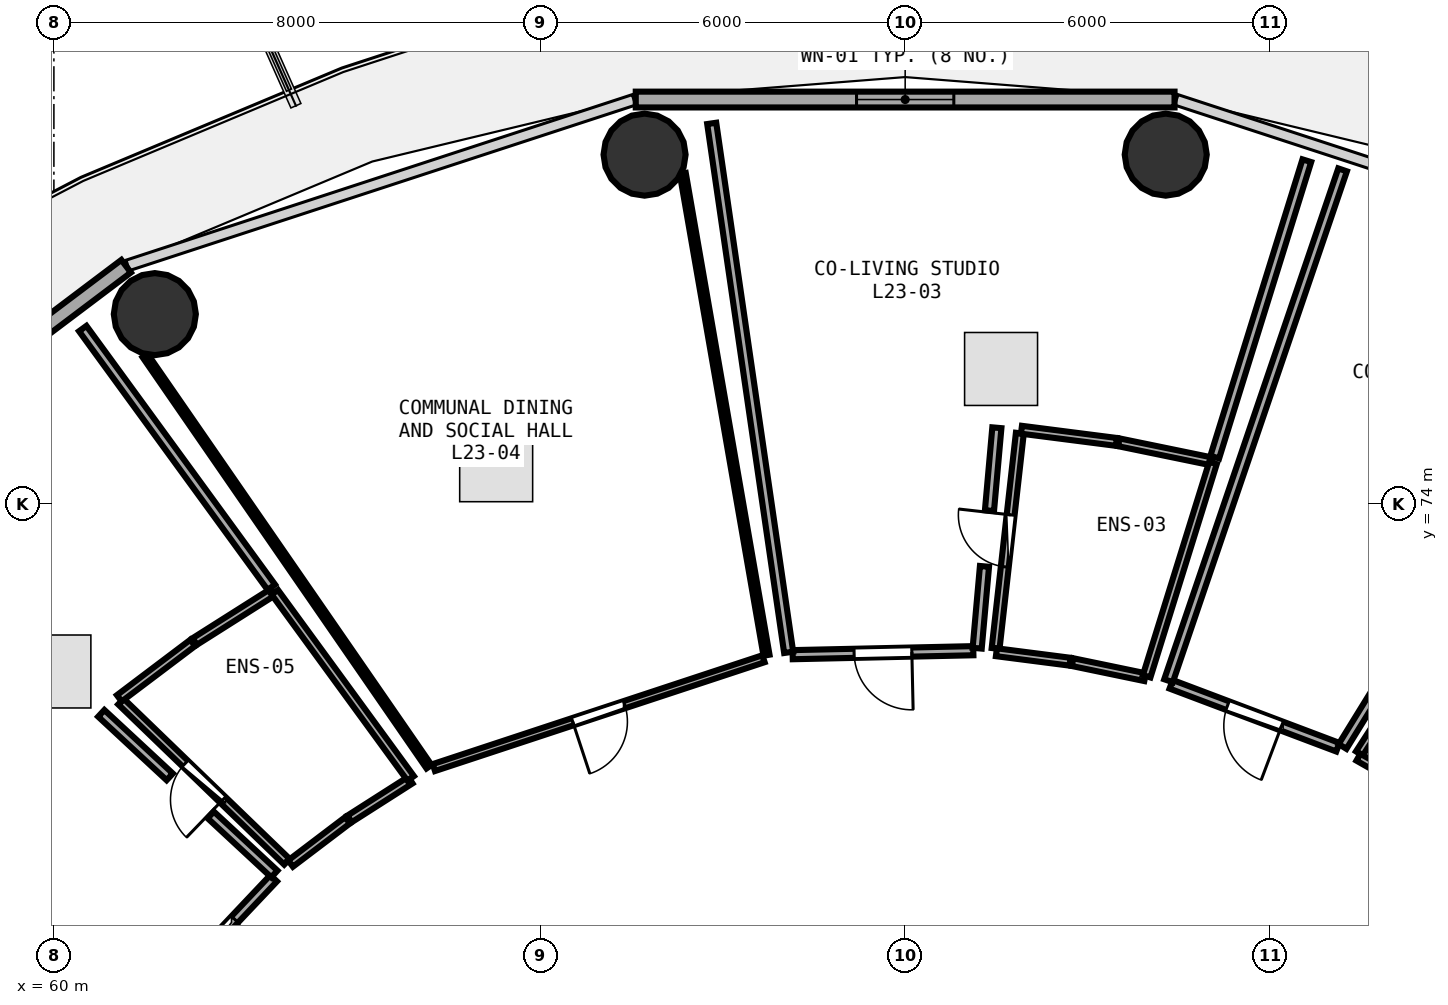
"""IFC4 building model, lengths in metres.
Left out: names, types, materials, properties, quantities, classifications, styles, units other than length and angle.
Written with IfcOpenShell. Run it as: python <this file> out.ifc"""

import sys

from ifc_helpers import new_model, si_unit, direction, frame, frame_2d, origin, origin_2d, place, context, subcontext, project, spatial, rectangle, circle, extrude, element, fill, save


model = new_model("IFC4")
c1 = context("Model", 3, precision=1e-05, world=origin(), true_north=direction((0.0, 1.0)))
c2 = subcontext(c1, "Body", "Model", "MODEL_VIEW")
j1 = project(units=[si_unit("LENGTHUNIT", "METRE"), si_unit("PLANEANGLEUNIT", "RADIAN")], contexts=[c1])
p1 = place(None, origin())
s1 = spatial("IfcSite", under=j1, at=p1, CompositionType="ELEMENT")
p2 = place(p1, origin())
s2 = spatial("IfcBuilding", under=s1, at=p2, CompositionType="ELEMENT")
p3 = place(p2, frame((0.0, 0.0, 91.35)))
s3 = spatial("IfcBuildingStorey", under=s2, at=p3, CompositionType="ELEMENT", Elevation=91.35)
for number, where, z_axis, x_axis in (
    (1, (78.286, 79.745, 0.0), (0.0, 0.0, 1.0), (1.0, 0.0, 0.0)),
    (2, (69.714, 79.745, 0.0), (0.0, 0.0, 1.0), (1.0, 0.0, 0.0)),
    (3, (61.66, 77.122, 0.0), (0.0, 0.0, 1.0), (1.0, 0.0, 0.0)),
):
    element("IfcColumn", number, at=place(p3, frame(where, z_axis=z_axis, x_axis=x_axis)), inside=s3, PredefinedType="COLUMN", context=c2, shape_type="SweptSolid", body=[
        extrude(circle(Radius=0.675, at=origin_2d()), origin(), (0.0, 0.0, 1.0), 3.75),
    ])
p4 = place(p3, frame((78.43, 80.651, 0.0), z_axis=(0.0, 0.0, 1.0), x_axis=(-1.0, 0.0, 0.0)))
e4 = element("IfcWall", 4, at=p4, inside=s3, PredefinedType="SOLIDWALL", context=c2, shape_type="SweptSolid", body=[
    extrude(rectangle(XDim=8.861, YDim=0.26, at=frame_2d((4.43, 0.0))), origin(), (0.0, 0.0, 1.0), 3.475),
])
p5 = place(p4, frame((3.63, 0.0, 0.85)))
e5 = element("IfcOpeningElement", 5, at=p5, cuts=e4, PredefinedType="OPENING", context=c2, shape_type="SweptSolid", body=[
    extrude(rectangle(XDim=1.6, YDim=1.45, at=frame_2d((0.8, 0.725))), frame((0.0, 0.14, 0.0), z_axis=(0.0, -1.0, 0.0), x_axis=(1.0, 0.0, 0.0)), (0.0, 0.0, 1.0), 0.28),
])
p6 = place(p3, frame((61.188, 77.91, 0.0), z_axis=(0.0, 0.0, 1.0), x_axis=(-0.798501507879, -0.601992808857, 0.0)))
e6 = element("IfcWall", 6, at=p6, inside=s3, PredefinedType="SOLIDWALL", context=c2, shape_type="SweptSolid", body=[
    extrude(rectangle(XDim=8.499, YDim=0.26, at=frame_2d((4.25, 0.0))), origin(), (0.0, 0.0, 1.0), 3.475),
])
p7 = place(p6, frame((3.45, 0.0, 0.85)))
e7 = element("IfcOpeningElement", 7, at=p7, cuts=e6, PredefinedType="OPENING", context=c2, shape_type="SweptSolid", body=[
    extrude(rectangle(XDim=1.6, YDim=1.45, at=frame_2d((0.8, 0.725))), frame((0.0, 0.14, 0.0), z_axis=(0.0, -1.0, 0.0), x_axis=(1.0, 0.0, 0.0)), (0.0, 0.0, 1.0), 0.28),
])
p8 = place(p3, frame((81.469, 69.896, 0.0), z_axis=(0.0, 0.0, 1.0), x_axis=(0.543429789712, 0.839454622748, 0.0)))
e8 = element("IfcWall", 8, at=p8, inside=s3, PredefinedType="PLUMBINGWALL", context=c2, shape_type="SweptSolid", body=[
    extrude(rectangle(XDim=3.686, YDim=0.13, at=frame_2d((1.843, 0.0))), origin(), (0.0, 0.0, 1.0), 3.175),
])
p9 = place(p8, frame((1.413, 0.0, 0.0)))
e9 = element("IfcOpeningElement", 9, at=p9, cuts=e8, PredefinedType="OPENING", context=c2, shape_type="SweptSolid", body=[
    extrude(rectangle(XDim=0.86, YDim=2.05, at=frame_2d((0.43, 1.025))), frame((0.0, 0.075, 0.0), z_axis=(0.0, -1.0, 0.0), x_axis=(1.0, 0.0, 0.0)), (0.0, 0.0, 1.0), 0.15),
])
p10 = place(p3, frame((81.117, 69.999, 0.0), z_axis=(0.0, 0.0, 1.0), x_axis=(-0.935632349103, 0.352976071868, 0.0)))
e10 = element("IfcWall", 10, at=p10, inside=s3, PredefinedType="PARTITIONING", context=c2, shape_type="SweptSolid", body=[
    extrude(rectangle(XDim=2.931, YDim=0.15, at=frame_2d((1.465, 0.0))), origin(), (0.0, 0.0, 1.0), 2.925),
])
p11 = place(p10, frame((0.99, 0.0, 0.0)))
e11 = element("IfcOpeningElement", 11, at=p11, cuts=e10, PredefinedType="OPENING", context=c2, shape_type="SweptSolid", body=[
    extrude(rectangle(XDim=0.95, YDim=2.08, at=frame_2d((0.475, 1.04))), frame((0.0, 0.085, 0.0), z_axis=(0.0, -1.0, 0.0), x_axis=(1.0, 0.0, 0.0)), (0.0, 0.0, 1.0), 0.17),
])
p12 = place(p3, frame((75.488, 71.624, 0.0), z_axis=(0.0, 0.0, 1.0), x_axis=(0.111853147635, 0.993724747284, 0.0)))
e12 = element("IfcWall", 12, at=p12, inside=s3, PredefinedType="PLUMBINGWALL", context=c2, shape_type="SweptSolid", body=[
    extrude(rectangle(XDim=3.562, YDim=0.13, at=frame_2d((1.781, 0.0))), origin(), (0.0, 0.0, 1.0), 3.175),
])
p13 = place(p12, frame((1.351, 0.0, 0.0)))
e13 = element("IfcOpeningElement", 13, at=p13, cuts=e12, PredefinedType="OPENING", context=c2, shape_type="SweptSolid", body=[
    extrude(rectangle(XDim=0.86, YDim=2.05, at=frame_2d((0.43, 1.025))), frame((0.0, 0.075, 0.0), z_axis=(0.0, -1.0, 0.0), x_axis=(1.0, 0.0, 0.0)), (0.0, 0.0, 1.0), 0.15),
])
p14 = place(p3, frame((75.121, 71.587, 0.0), z_axis=(0.0, 0.0, 1.0), x_axis=(-0.999757617916, -0.022016026426, 0.0)))
e14 = element("IfcWall", 14, at=p14, inside=s3, PredefinedType="PARTITIONING", context=c2, shape_type="SweptSolid", body=[
    extrude(rectangle(XDim=2.972, YDim=0.15, at=frame_2d((1.486, 0.0))), origin(), (0.0, 0.0, 1.0), 3.48),
])
p15 = place(p14, frame((1.011, 0.0, 0.0)))
e15 = element("IfcOpeningElement", 15, at=p15, cuts=e14, PredefinedType="OPENING", context=c2, shape_type="SweptSolid", body=[
    extrude(rectangle(XDim=0.95, YDim=2.08, at=frame_2d((0.475, 1.04))), frame((0.0, 0.085, 0.0), z_axis=(0.0, -1.0, 0.0), x_axis=(1.0, 0.0, 0.0)), (0.0, 0.0, 1.0), 0.17),
])
p16 = place(p3, frame((71.67, 71.454, 0.0), z_axis=(0.0, 0.0, 1.0), x_axis=(-0.949607265123, -0.313442246716, 0.0)))
e16 = element("IfcWall", 16, at=p16, inside=s3, PredefinedType="PARTITIONING", context=c2, shape_type="SweptSolid", body=[
    extrude(rectangle(XDim=5.708, YDim=0.12, at=frame_2d((2.854, 0.0))), origin(), (0.0, 0.0, 1.0), 2.925),
])
p17 = place(p16, frame((2.404, 0.0, 0.0)))
e17 = element("IfcOpeningElement", 17, at=p17, cuts=e16, PredefinedType="OPENING", context=c2, shape_type="SweptSolid", body=[
    extrude(rectangle(XDim=0.9, YDim=2.08, at=frame_2d((0.45, 1.04))), frame((0.0, 0.07, 0.0), z_axis=(0.0, -1.0, 0.0), x_axis=(1.0, 0.0, 0.0)), (0.0, 0.0, 1.0), 0.14),
])
p18 = place(p3, frame((63.833, 68.116, 0.0), z_axis=(0.0, 0.0, 1.0), x_axis=(-0.719513452588, 0.694478503299, 0.0)))
e18 = element("IfcWall", 18, at=p18, inside=s3, PredefinedType="PLUMBINGWALL", context=c2, shape_type="SweptSolid", body=[
    extrude(rectangle(XDim=3.793, YDim=0.13, at=frame_2d((1.897, 0.0))), origin(), (0.0, 0.0, 1.0), 3.175),
])
p19 = place(p18, frame((1.467, 0.0, 0.0)))
e19 = element("IfcOpeningElement", 19, at=p19, cuts=e18, PredefinedType="OPENING", context=c2, shape_type="SweptSolid", body=[
    extrude(rectangle(XDim=0.86, YDim=2.05, at=frame_2d((0.43, 1.025))), frame((0.0, 0.075, 0.0), z_axis=(0.0, -1.0, 0.0), x_axis=(1.0, 0.0, 0.0)), (0.0, 0.0, 1.0), 0.15),
])
p20 = place(p3, frame((63.614, 67.844, 0.0), z_axis=(0.0, 0.0, 1.0), x_axis=(-0.68683784084, -0.726810690889, 0.0)))
e20 = element("IfcWall", 20, at=p20, inside=s3, PredefinedType="PARTITIONING", context=c2, shape_type="SweptSolid", body=[
    extrude(rectangle(XDim=2.81, YDim=0.15, at=frame_2d((1.405, 0.0))), origin(), (0.0, 0.0, 1.0), 2.925),
])
p21 = place(p20, frame((0.93, 0.0, 0.0)))
e21 = element("IfcOpeningElement", 21, at=p21, cuts=e20, PredefinedType="OPENING", context=c2, shape_type="SweptSolid", body=[
    extrude(rectangle(XDim=0.95, YDim=2.08, at=frame_2d((0.475, 1.04))), frame((0.0, 0.085, 0.0), z_axis=(0.0, -1.0, 0.0), x_axis=(1.0, 0.0, 0.0)), (0.0, 0.0, 1.0), 0.17),
])
p22 = place(p3, frame((82.49, 69.246, 0.0), z_axis=(0.0, 0.0, 1.0), x_axis=(-0.869224537935, 0.494417538778, 0.0)))
e22 = element("IfcWall", 22, at=p22, inside=s3, PredefinedType="PLUMBINGWALL", context=c2, shape_type="SweptSolid", body=[
    extrude(rectangle(XDim=1.192, YDim=0.13, at=frame_2d((0.596, 0.0))), origin(), (0.0, 0.0, 1.0), 3.48),
])
p23 = place(p3, frame((78.332, 71.093, 0.0), z_axis=(0.0, 0.0, 1.0), x_axis=(0.322500856516, 0.946569172088, 0.0)))
e23 = element("IfcWall", 23, at=p23, inside=s3, PredefinedType="PARTITIONING", context=c2, shape_type="SweptSolid", body=[
    extrude(rectangle(XDim=8.875, YDim=0.15, at=frame_2d((4.438, 0.0))), origin(), (0.0, 0.0, 1.0), 2.925),
])
p24 = place(p3, frame((81.948, 71.233, 0.0), z_axis=(0.0, 0.0, 1.0), x_axis=(-0.52498935376, -0.851108793539, 0.0)))
e24 = element("IfcWall", 24, at=p24, inside=s3, PredefinedType="PARTITIONING", context=c2, shape_type="SweptSolid", body=[
    extrude(rectangle(XDim=1.435, YDim=0.15, at=frame_2d((0.718, 0.0))), origin(), (0.0, 0.0, 1.0), 3.235),
])
p25 = place(p3, frame((77.946, 71.151, 0.0), z_axis=(0.0, 0.0, 1.0), x_axis=(-0.979121805859, 0.203274418684, 0.0)))
e25 = element("IfcWall", 25, at=p25, inside=s3, PredefinedType="PLUMBINGWALL", context=c2, shape_type="SweptSolid", body=[
    extrude(rectangle(XDim=1.219, YDim=0.13, at=frame_2d((0.609, 0.0))), origin(), (0.0, 0.0, 1.0), 3.48),
])
p26 = place(p3, frame((76.713, 71.406, 0.0), z_axis=(0.0, 0.0, 1.0), x_axis=(-0.991848040681, 0.127426308891, 0.0)))
e26 = element("IfcWall", 26, at=p26, inside=s3, PredefinedType="PLUMBINGWALL", context=c2, shape_type="SweptSolid", body=[
    extrude(rectangle(XDim=1.222, YDim=0.13, at=frame_2d((0.611, 0.0))), origin(), (0.0, 0.0, 1.0), 3.48),
])
p27 = place(p3, frame((75.913, 75.22, 0.0), z_axis=(0.0, 0.0, 1.0), x_axis=(0.991898711333, -0.127031281405, 0.0)))
e27 = element("IfcWall", 27, at=p27, inside=s3, PredefinedType="PLUMBINGWALL", context=c2, shape_type="SweptSolid", body=[
    extrude(rectangle(XDim=1.574, YDim=0.13, at=frame_2d((0.787, 0.0))), origin(), (0.0, 0.0, 1.0), 3.48),
])
p28 = place(p3, frame((77.514, 75.014, 0.0), z_axis=(0.0, 0.0, 1.0), x_axis=(0.979487788462, -0.201503529137, 0.0)))
e28 = element("IfcWall", 28, at=p28, inside=s3, PredefinedType="PLUMBINGWALL", context=c2, shape_type="SweptSolid", body=[
    extrude(rectangle(XDim=1.568, YDim=0.13, at=frame_2d((0.784, 0.0))), origin(), (0.0, 0.0, 1.0), 3.48),
])
p29 = place(p3, frame((79.063, 74.675, 0.0), z_axis=(0.0, 0.0, 1.0), x_axis=(-0.296927892497, -0.954899903999, 0.0)))
e29 = element("IfcWall", 29, at=p29, inside=s3, PredefinedType="PLUMBINGWALL", context=c2, shape_type="SweptSolid", body=[
    extrude(rectangle(XDim=3.675, YDim=0.13, at=frame_2d((1.837, 0.0))), origin(), (0.0, 0.0, 1.0), 3.175),
])
p30 = place(p3, frame((72.084, 71.56, 0.0), z_axis=(0.0, 0.0, 1.0), x_axis=(-0.143952208647, 0.989584640961, 0.0)))
e30 = element("IfcWall", 30, at=p30, inside=s3, PredefinedType="PARTITIONING", context=c2, shape_type="SweptSolid", body=[
    extrude(rectangle(XDim=8.79, YDim=0.15, at=frame_2d((4.395, 0.0))), origin(), (0.0, 0.0, 1.0), 2.975),
])
p31 = place(p3, frame((80.606, 79.645, 0.0), z_axis=(0.0, 0.0, 1.0), x_axis=(-0.2966895532, -0.954973983427, 0.0)))
e31 = element("IfcWall", 31, at=p31, inside=s3, PredefinedType="PARTITIONING", context=c2, shape_type="SweptSolid", body=[
    extrude(rectangle(XDim=5.104, YDim=0.15, at=frame_2d((2.552, 0.0))), origin(), (0.0, 0.0, 1.0), 2.925),
])
p32 = place(p3, frame((75.508, 75.253, 0.0), z_axis=(0.0, 0.0, 1.0), x_axis=(-0.088846600374, -0.996045321058, 0.0)))
e32 = element("IfcWall", 32, at=p32, inside=s3, PredefinedType="PARTITIONING", context=c2, shape_type="SweptSolid", body=[
    extrude(rectangle(XDim=1.368, YDim=0.15, at=frame_2d((0.684, 0.0))), origin(), (0.0, 0.0, 1.0), 3.175),
])
p33 = place(p3, frame((75.305, 72.973, 0.0), z_axis=(0.0, 0.0, 1.0), x_axis=(-0.088906327267, -0.996039991653, 0.0)))
e33 = element("IfcWall", 33, at=p33, inside=s3, PredefinedType="PARTITIONING", context=c2, shape_type="SweptSolid", body=[
    extrude(rectangle(XDim=1.351, YDim=0.15, at=frame_2d((0.676, 0.0))), origin(), (0.0, 0.0, 1.0), 3.48),
])
p34 = place(p3, frame((66.169, 69.679, 0.0), z_axis=(0.0, 0.0, 1.0), x_axis=(-0.568250117639, 0.822855882766, 0.0)))
e34 = element("IfcWall", 34, at=p34, inside=s3, PredefinedType="PARTITIONING", context=c2, shape_type="SweptSolid", body=[
    extrude(rectangle(XDim=8.217, YDim=0.1, at=frame_2d((4.108, 0.0))), origin(), (0.0, 0.0, 1.0), 2.925),
])
p35 = place(p3, frame((70.343, 79.436, 0.0), z_axis=(0.0, 0.0, 1.0), x_axis=(0.171306583965, -0.985217769983, 0.0)))
e35 = element("IfcWall", 35, at=p35, inside=s3, PredefinedType="PARTITIONING", context=c2, shape_type="SweptSolid", body=[
    extrude(rectangle(XDim=8.042, YDim=0.1, at=frame_2d((4.021, 0.0))), origin(), (0.0, 0.0, 1.0), 3.175),
])
p36 = place(p3, frame((65.863, 69.459, 0.0), z_axis=(0.0, 0.0, 1.0), x_axis=(-0.842932135958, -0.538019901276, 0.0)))
e36 = element("IfcWall", 36, at=p36, inside=s3, PredefinedType="PLUMBINGWALL", context=c2, shape_type="SweptSolid", body=[
    extrude(rectangle(XDim=1.187, YDim=0.13, at=frame_2d((0.593, 0.0))), origin(), (0.0, 0.0, 1.0), 3.48),
])
p37 = place(p3, frame((64.83, 68.798, 0.0), z_axis=(0.0, 0.0, 1.0), x_axis=(-0.796729134499, -0.604336567022, 0.0)))
e37 = element("IfcWall", 37, at=p37, inside=s3, PredefinedType="PLUMBINGWALL", context=c2, shape_type="SweptSolid", body=[
    extrude(rectangle(XDim=1.177, YDim=0.13, at=frame_2d((0.589, 0.0))), origin(), (0.0, 0.0, 1.0), 2.925),
])
p38 = place(p3, frame((61.076, 70.804, 0.0), z_axis=(0.0, 0.0, 1.0), x_axis=(0.798136421733, 0.602476764949, 0.0)))
e38 = element("IfcWall", 38, at=p38, inside=s3, PredefinedType="PLUMBINGWALL", context=c2, shape_type="SweptSolid", body=[
    extrude(rectangle(XDim=1.512, YDim=0.13, at=frame_2d((0.756, 0.0))), origin(), (0.0, 0.0, 1.0), 3.48),
])
p39 = place(p3, frame((62.316, 71.738, 0.0), z_axis=(0.0, 0.0, 1.0), x_axis=(0.844925229622, 0.534884432703, 0.0)))
e39 = element("IfcWall", 39, at=p39, inside=s3, PredefinedType="PLUMBINGWALL", context=c2, shape_type="SweptSolid", body=[
    extrude(rectangle(XDim=1.524, YDim=0.13, at=frame_2d((0.762, 0.0))), origin(), (0.0, 0.0, 1.0), 2.925),
])
p40 = place(p3, frame((63.633, 72.548, 0.0), z_axis=(0.0, 0.0, 1.0), x_axis=(0.589656455867, -0.807654173551, 0.0)))
e40 = element("IfcWall", 40, at=p40, inside=s3, PredefinedType="PLUMBINGWALL", context=c2, shape_type="SweptSolid", body=[
    extrude(rectangle(XDim=3.791, YDim=0.13, at=frame_2d((1.896, 0.0))), origin(), (0.0, 0.0, 1.0), 3.175),
])
p41 = place(p3, frame((61.609, 65.78, 0.0), z_axis=(0.0, 0.0, 1.0), x_axis=(-0.853785143599, 0.520625516634, 0.0)))
e41 = element("IfcWall", 41, at=p41, inside=s3, PredefinedType="PARTITIONING", context=c2, shape_type="SweptSolid", body=[
    extrude(rectangle(XDim=9.597, YDim=0.15, at=frame_2d((4.798, 0.0))), origin(), (0.0, 0.0, 1.0), 2.975),
])
p42 = place(p3, frame((60.475, 76.885, 0.0), z_axis=(0.0, 0.0, 1.0), x_axis=(0.589128007392, -0.808039721119, 0.0)))
e42 = element("IfcWall", 42, at=p42, inside=s3, PredefinedType="PARTITIONING", context=c2, shape_type="SweptSolid", body=[
    extrude(rectangle(XDim=5.265, YDim=0.15, at=frame_2d((2.633, 0.0))), origin(), (0.0, 0.0, 1.0), 2.925),
])
p43 = place(p3, frame((60.779, 70.557, 0.0), z_axis=(0.0, 0.0, 1.0), x_axis=(0.732929378099, -0.680304730778, 0.0)))
e43 = element("IfcWall", 43, at=p43, inside=s3, PredefinedType="PARTITIONING", context=c2, shape_type="SweptSolid", body=[
    extrude(rectangle(XDim=1.536, YDim=0.15, at=frame_2d((0.768, 0.0))), origin(), (0.0, 0.0, 1.0), 3.175),
])
p44 = place(p3, frame((62.579, 68.886, 0.0), z_axis=(0.0, 0.0, 1.0), x_axis=(0.733037104662, -0.680188652646, 0.0)))
e44 = element("IfcWall", 44, at=p44, inside=s3, PredefinedType="PARTITIONING", context=c2, shape_type="SweptSolid", body=[
    extrude(rectangle(XDim=1.427, YDim=0.15, at=frame_2d((0.714, 0.0))), origin(), (0.0, 0.0, 1.0), 3.235),
])
p45 = place(p3, frame((53.073, 70.322, 0.0), z_axis=(0.0, 0.0, 1.0), x_axis=(0.865606852524, -0.500724252322, 0.0)))
e45 = element("IfcWall", 45, at=p45, inside=s3, PredefinedType="PARTITIONING", context=c2, shape_type="SweptSolid", body=[
    extrude(rectangle(XDim=9.624, YDim=0.1, at=frame_2d((4.812, 0.0))), origin(), (0.0, 0.0, 1.0), 2.975),
])
p46 = place(p5, origin())
e46 = element("IfcWindow", 46, at=p46, inside=s3, PartitioningType="SINGLE_PANEL", PredefinedType="WINDOW", context=c2, shape_type="SweptSolid", body=[
    extrude(rectangle(XDim=1.6, YDim=1.45, at=frame_2d((0.8, 0.725))), frame((0.0, 0.03, 0.0), z_axis=(0.0, -1.0, 0.0), x_axis=(1.0, 0.0, 0.0)), (0.0, 0.0, 1.0), 0.06),
])
fill(e5, e46)
p47 = place(p11, origin())
e47 = element("IfcDoor", 47, at=p47, inside=s3, OperationType="SINGLE_SWING_LEFT", PredefinedType="DOOR", context=c2, shape_type="SweptSolid", body=[
    extrude(rectangle(XDim=0.95, YDim=2.08, at=frame_2d((0.475, 1.04))), frame((0.0, 0.025, 0.0), z_axis=(0.0, -1.0, 0.0), x_axis=(1.0, 0.0, 0.0)), (0.0, 0.0, 1.0), 0.05),
])
fill(e11, e47)
p48 = place(p13, origin())
e48 = element("IfcDoor", 48, at=p48, inside=s3, OperationType="SINGLE_SWING_RIGHT", PredefinedType="DOOR", context=c2, shape_type="SweptSolid", body=[
    extrude(rectangle(XDim=0.86, YDim=2.05, at=frame_2d((0.43, 1.025))), frame((0.0, 0.025, 0.0), z_axis=(0.0, -1.0, 0.0), x_axis=(1.0, 0.0, 0.0)), (0.0, 0.0, 1.0), 0.05),
])
fill(e13, e48)
p49 = place(p15, origin())
e49 = element("IfcDoor", 49, at=p49, inside=s3, OperationType="SINGLE_SWING_LEFT", PredefinedType="DOOR", context=c2, shape_type="SweptSolid", body=[
    extrude(rectangle(XDim=0.95, YDim=2.08, at=frame_2d((0.475, 1.04))), frame((0.0, 0.025, 0.0), z_axis=(0.0, -1.0, 0.0), x_axis=(1.0, 0.0, 0.0)), (0.0, 0.0, 1.0), 0.05),
])
fill(e15, e49)
p50 = place(p17, origin())
e50 = element("IfcDoor", 50, at=p50, inside=s3, OperationType="SINGLE_SWING_RIGHT", PredefinedType="DOOR", context=c2, shape_type="SweptSolid", body=[
    extrude(rectangle(XDim=0.9, YDim=2.08, at=frame_2d((0.45, 1.04))), frame((0.0, 0.025, 0.0), z_axis=(0.0, -1.0, 0.0), x_axis=(1.0, 0.0, 0.0)), (0.0, 0.0, 1.0), 0.05),
])
fill(e17, e50)
p51 = place(p19, origin())
e51 = element("IfcDoor", 51, at=p51, inside=s3, OperationType="SINGLE_SWING_LEFT", PredefinedType="DOOR", context=c2, shape_type="SweptSolid", body=[
    extrude(rectangle(XDim=0.86, YDim=2.05, at=frame_2d((0.43, 1.025))), frame((0.0, 0.025, 0.0), z_axis=(0.0, -1.0, 0.0), x_axis=(1.0, 0.0, 0.0)), (0.0, 0.0, 1.0), 0.05),
])
fill(e19, e51)
p52 = place(p21, origin())
e52 = element("IfcDoor", 52, at=p52, inside=s3, OperationType="SINGLE_SWING_RIGHT", PredefinedType="DOOR", context=c2, shape_type="SweptSolid", body=[
    extrude(rectangle(XDim=0.95, YDim=2.08, at=frame_2d((0.475, 1.04))), frame((0.0, 0.025, 0.0), z_axis=(0.0, -1.0, 0.0), x_axis=(1.0, 0.0, 0.0)), (0.0, 0.0, 1.0), 0.05),
])
fill(e21, e52)
save(model, sys.argv[1])
